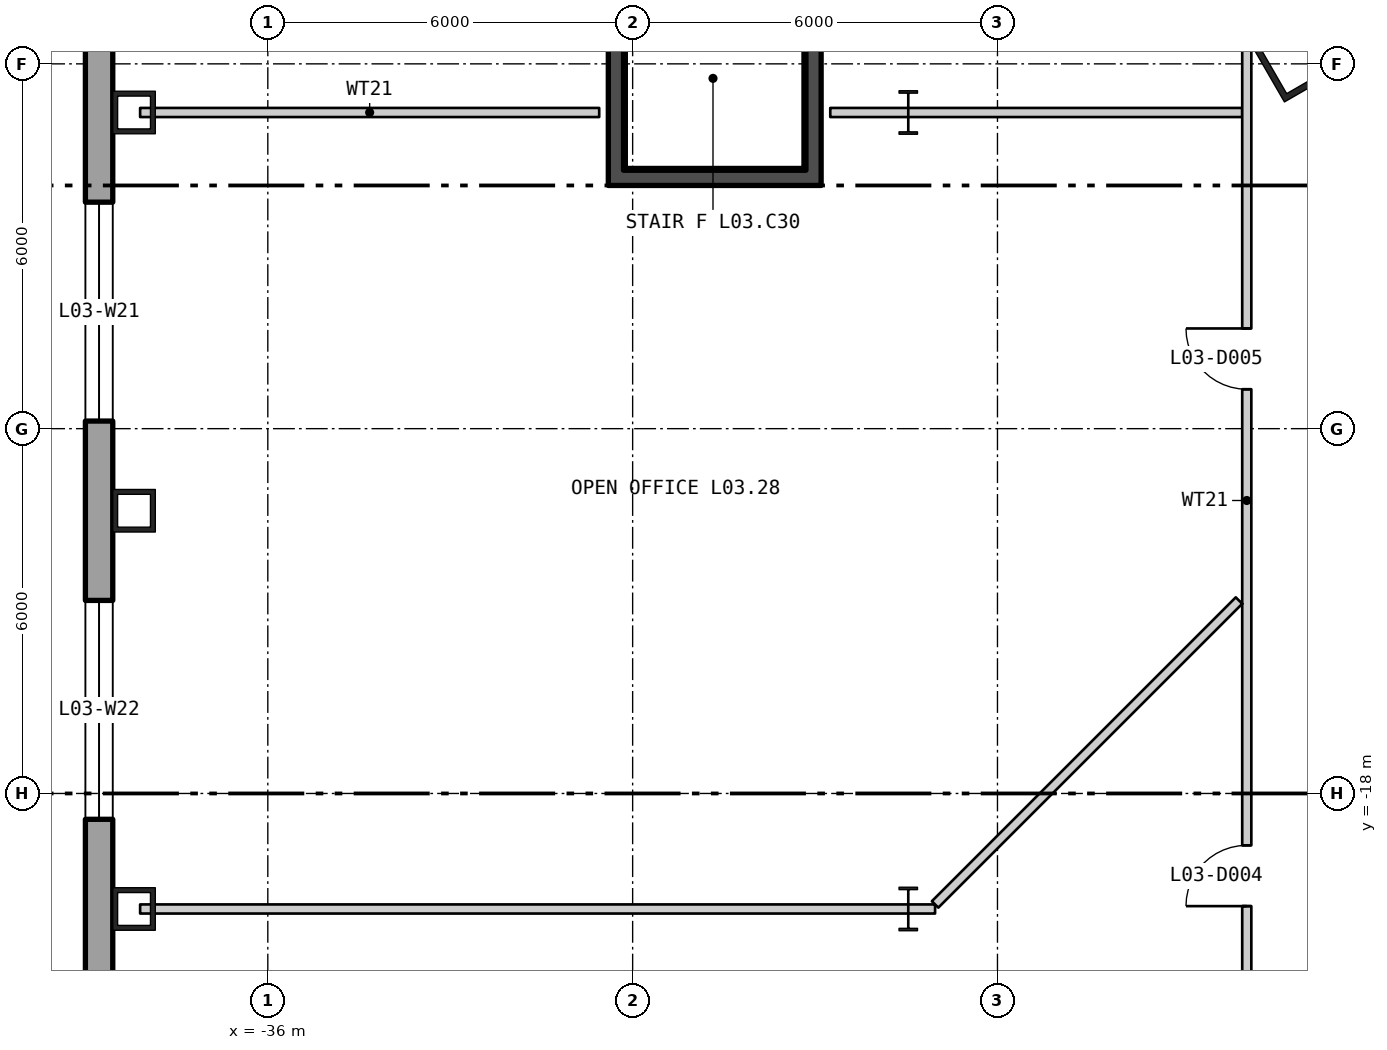
"""IFC4 building model, lengths in metres.
Left out: names, types, materials, properties, quantities, classifications, styles, units other than length and angle.
Written with IfcOpenShell. Run it as: python <this file> out.ifc"""

import sys

from ifc_helpers import new_model, si_unit, direction, frame, frame_2d, origin, origin_2d, place, context, subcontext, project, spatial, polyline, rectangle, hollow_rectangle, i_section, outline, extrude, element, fill, save


model = new_model("IFC4")
c1 = context("Model", 3, precision=1e-05, world=origin(), true_north=direction((0.0, 1.0)))
c2 = subcontext(c1, "Body", "Model", "MODEL_VIEW")
j1 = project(units=[si_unit("LENGTHUNIT", "METRE"), si_unit("PLANEANGLEUNIT", "RADIAN")], contexts=[c1])
p1 = place(None, origin())
s1 = spatial("IfcSite", under=j1, at=p1, CompositionType="ELEMENT")
p2 = place(p1, origin())
s2 = spatial("IfcBuilding", under=s1, at=p2, CompositionType="ELEMENT")
p3 = place(p2, frame((0.0, 0.0, 18.6)))
s3 = spatial("IfcBuildingStorey", under=s2, at=p3, CompositionType="ELEMENT", Elevation=18.6)
p4 = place(p3, frame((-19.061, -5.807, 0.0), z_axis=(0.0, 0.0, 1.0), x_axis=(0.5, -0.866025403784, 0.0)))
e1 = element("IfcColumn", 1, at=p4, inside=s3, PredefinedType="COLUMN", context=c2, shape_type="SweptSolid", body=[
    extrude(hollow_rectangle(XDim=1.2, YDim=1.2, WallThickness=0.1, at=origin_2d()), origin(), (0.0, 0.0, 1.0), 5.1),
])
for number, where, z_axis, x_axis in (
    (2, (-38.2, -6.8, 0.0), (0.0, 0.0, 1.0), (0.0, -1.0, 0.0)),
    (3, (-38.2, -13.35, 0.0), (0.0, 0.0, 1.0), (0.0, -1.0, 0.0)),
    (4, (-38.2, -19.9, 0.0), (0.0, 0.0, 1.0), (0.0, -1.0, 0.0)),
):
    element("IfcColumn", number, at=place(p3, frame(where, z_axis=z_axis, x_axis=x_axis)), inside=s3, PredefinedType="COLUMN", context=c2, shape_type="SweptSolid", body=[
        extrude(hollow_rectangle(XDim=0.7, YDim=0.7, WallThickness=0.08, at=origin_2d()), origin(), (0.0, 0.0, 1.0), 5.1),
    ])
for number, where, z_axis, x_axis in (
    (5, (-25.467, -6.8, 0.0), (0.0, 0.0, 1.0), (1.0, 0.0, 0.0)),
    (6, (-25.467, -19.9, 0.0), (0.0, 0.0, 1.0), (1.0, 0.0, 0.0)),
):
    element("IfcColumn", number, at=place(p3, frame(where, z_axis=z_axis, x_axis=x_axis)), inside=s3, PredefinedType="COLUMN", context=c2, shape_type="SweptSolid", body=[
        extrude(i_section(OverallWidth=0.304, OverallDepth=0.716, WebThickness=0.021, FlangeThickness=0.04, at=origin_2d()), origin(), (0.0, 0.0, 1.0), 5.1),
    ])
p5 = place(p3, frame((-38.775, 19.975, -0.4), z_axis=(0.0, 0.0, 1.0), x_axis=(0.0, -1.0, 0.0)))
e7 = element("IfcWall", 7, at=p5, inside=s3, PredefinedType="SOLIDWALL", context=c2, shape_type="SweptSolid", body=[
    extrude(outline(polyline([(-0.225, -0.225), (53.775, -0.225), (53.325, 0.225), (0.225, 0.225), (-0.225, -0.225)])), origin(), (0.0, 0.0, 1.0), 5.1),
])
p6 = place(p5, frame((2.05, 0.0, 1.3)))
e8 = element("IfcOpeningElement", 8, at=p6, cuts=e7, PredefinedType="OPENING", context=c2, shape_type="SweptSolid", body=[
    extrude(rectangle(XDim=3.6, YDim=3.2, at=frame_2d((1.8, 1.6))), frame((0.0, 0.235, 0.0), z_axis=(0.0, -1.0, 0.0), x_axis=(1.0, 0.0, 0.0)), (0.0, 0.0, 1.0), 0.47),
])
p7 = place(p5, frame((8.6, 0.0, 1.3)))
e9 = element("IfcOpeningElement", 9, at=p7, cuts=e7, PredefinedType="OPENING", context=c2, shape_type="SweptSolid", body=[
    extrude(rectangle(XDim=3.6, YDim=3.2, at=frame_2d((1.8, 1.6))), frame((0.0, 0.235, 0.0), z_axis=(0.0, -1.0, 0.0), x_axis=(1.0, 0.0, 0.0)), (0.0, 0.0, 1.0), 0.47),
])
p8 = place(p5, frame((15.15, 0.0, 1.3)))
e10 = element("IfcOpeningElement", 10, at=p8, cuts=e7, PredefinedType="OPENING", context=c2, shape_type="SweptSolid", body=[
    extrude(rectangle(XDim=3.6, YDim=3.2, at=frame_2d((1.8, 1.6))), frame((0.0, 0.235, 0.0), z_axis=(0.0, -1.0, 0.0), x_axis=(1.0, 0.0, 0.0)), (0.0, 0.0, 1.0), 0.47),
])
p9 = place(p5, frame((21.7, 0.0, 1.3)))
e11 = element("IfcOpeningElement", 11, at=p9, cuts=e7, PredefinedType="OPENING", context=c2, shape_type="SweptSolid", body=[
    extrude(rectangle(XDim=3.6, YDim=3.2, at=frame_2d((1.8, 1.6))), frame((0.0, 0.235, 0.0), z_axis=(0.0, -1.0, 0.0), x_axis=(1.0, 0.0, 0.0)), (0.0, 0.0, 1.0), 0.47),
])
p10 = place(p5, frame((28.25, 0.0, 1.3)))
e12 = element("IfcOpeningElement", 12, at=p10, cuts=e7, PredefinedType="OPENING", context=c2, shape_type="SweptSolid", body=[
    extrude(rectangle(XDim=3.6, YDim=3.2, at=frame_2d((1.8, 1.6))), frame((0.0, 0.235, 0.0), z_axis=(0.0, -1.0, 0.0), x_axis=(1.0, 0.0, 0.0)), (0.0, 0.0, 1.0), 0.47),
])
p11 = place(p5, frame((34.8, 0.0, 1.3)))
e13 = element("IfcOpeningElement", 13, at=p11, cuts=e7, PredefinedType="OPENING", context=c2, shape_type="SweptSolid", body=[
    extrude(rectangle(XDim=3.6, YDim=3.2, at=frame_2d((1.8, 1.6))), frame((0.0, 0.235, 0.0), z_axis=(0.0, -1.0, 0.0), x_axis=(1.0, 0.0, 0.0)), (0.0, 0.0, 1.0), 0.47),
])
p12 = place(p5, frame((41.35, 0.0, 1.3)))
e14 = element("IfcOpeningElement", 14, at=p12, cuts=e7, PredefinedType="OPENING", context=c2, shape_type="SweptSolid", body=[
    extrude(rectangle(XDim=3.6, YDim=3.2, at=frame_2d((1.8, 1.6))), frame((0.0, 0.235, 0.0), z_axis=(0.0, -1.0, 0.0), x_axis=(1.0, 0.0, 0.0)), (0.0, 0.0, 1.0), 0.47),
])
p13 = place(p5, frame((47.9, 0.0, 1.3)))
e15 = element("IfcOpeningElement", 15, at=p13, cuts=e7, PredefinedType="OPENING", context=c2, shape_type="SweptSolid", body=[
    extrude(rectangle(XDim=3.6, YDim=3.2, at=frame_2d((1.8, 1.6))), frame((0.0, 0.235, 0.0), z_axis=(0.0, -1.0, 0.0), x_axis=(1.0, 0.0, 0.0)), (0.0, 0.0, 1.0), 0.47),
])
p14 = place(p3, frame((-30.275, -7.75, 0.0), z_axis=(0.0, 0.0, 1.0), x_axis=(0.0, 1.0, 0.0)))
e16 = element("IfcWall", 16, at=p14, inside=s3, PredefinedType="SHEAR", context=c2, shape_type="SweptSolid", body=[
    extrude(rectangle(XDim=7.3, YDim=0.25, at=frame_2d((3.65, 0.0))), origin(), (0.0, 0.0, 1.0), 4.88),
])
p15 = place(p3, frame((-27.025, -7.75, 0.0), z_axis=(0.0, 0.0, 1.0), x_axis=(0.0, 1.0, 0.0)))
e17 = element("IfcWall", 17, at=p15, inside=s3, PredefinedType="SHEAR", context=c2, shape_type="SweptSolid", body=[
    extrude(rectangle(XDim=7.3, YDim=0.25, at=frame_2d((3.65, 0.0))), origin(), (0.0, 0.0, 1.0), 4.88),
])
p16 = place(p15, frame((5.7, 0.0, 0.0)))
e18 = element("IfcOpeningElement", 18, at=p16, cuts=e17, PredefinedType="OPENING", context=c2, shape_type="SweptSolid", body=[
    extrude(rectangle(XDim=1.2, YDim=2.1, at=frame_2d((0.6, 1.05))), frame((0.0, 0.135, 0.0), z_axis=(0.0, -1.0, 0.0), x_axis=(1.0, 0.0, 0.0)), (0.0, 0.0, 1.0), 0.27),
])
p17 = place(p3, frame((-30.4, -7.875, 0.0), z_axis=(0.0, 0.0, 1.0), x_axis=(1.0, 0.0, 0.0)))
e19 = element("IfcWall", 19, at=p17, inside=s3, PredefinedType="SHEAR", context=c2, shape_type="SweptSolid", body=[
    extrude(rectangle(XDim=3.5, YDim=0.25, at=frame_2d((1.75, 0.0))), origin(), (0.0, 0.0, 1.0), 4.88),
])
p18 = place(p3, frame((-38.1, -19.9, 0.0), z_axis=(0.0, 0.0, 1.0), x_axis=(1.0, 0.0, 0.0)))
e20 = element("IfcWall", 20, at=p18, inside=s3, PredefinedType="PARTITIONING", context=c2, shape_type="SweptSolid", body=[
    extrude(rectangle(XDim=12.633, YDim=0.15, at=frame_2d((6.316, 0.0))), origin(), (0.0, 0.0, 1.0), 4.09),
])
p19 = place(p3, frame((-25.467, -19.9, 0.0), z_axis=(0.0, 0.0, 1.0), x_axis=(1.0, 0.0, 0.0)))
e21 = element("IfcWall", 21, at=p19, inside=s3, PredefinedType="PARTITIONING", context=c2, shape_type="SweptSolid", body=[
    extrude(rectangle(XDim=0.441, YDim=0.15, at=frame_2d((0.221, 0.0))), origin(), (0.0, 0.0, 1.0), 4.88),
])
p20 = place(p3, frame((-38.1, -6.8, 0.0), z_axis=(0.0, 0.0, 1.0), x_axis=(1.0, 0.0, 0.0)))
e22 = element("IfcWall", 22, at=p20, inside=s3, PredefinedType="PARTITIONING", context=c2, shape_type="SweptSolid", body=[
    extrude(rectangle(XDim=7.55, YDim=0.15, at=frame_2d((3.775, 0.0))), origin(), (0.0, 0.0, 1.0), 4.09),
])
p21 = place(p3, frame((-26.75, -6.8, 0.0), z_axis=(0.0, 0.0, 1.0), x_axis=(1.0, 0.0, 0.0)))
e23 = element("IfcWall", 23, at=p21, inside=s3, PredefinedType="PARTITIONING", context=c2, shape_type="SweptSolid", body=[
    extrude(rectangle(XDim=6.775, YDim=0.15, at=frame_2d((3.388, 0.0))), origin(), (0.0, 0.0, 1.0), 4.09),
])
p22 = place(p3, frame((-25.026, -19.825, 0.0), z_axis=(0.0, 0.0, 1.0), x_axis=(0.707106781187, 0.707106781187, 0.0)))
e24 = element("IfcWall", 24, at=p22, inside=s3, PredefinedType="PARTITIONING", context=c2, shape_type="SweptSolid", body=[
    extrude(rectangle(XDim=7.068, YDim=0.15, at=frame_2d((3.534, 0.0))), origin(), (0.0, 0.0, 1.0), 4.88),
])
p23 = place(p3, frame((-19.9, -23.775, 0.0), z_axis=(0.0, 0.0, 1.0), x_axis=(0.0, 1.0, 0.0)))
e25 = element("IfcWall", 25, at=p23, inside=s3, PredefinedType="PARTITIONING", context=c2, shape_type="SweptSolid", body=[
    extrude(rectangle(XDim=21.187, YDim=0.15, at=frame_2d((10.594, 0.0))), origin(), (0.0, 0.0, 1.0), 4.88),
])
p24 = place(p23, frame((3.922, 0.0, 0.0)))
e26 = element("IfcOpeningElement", 26, at=p24, cuts=e25, PredefinedType="OPENING", context=c2, shape_type="SweptSolid", body=[
    extrude(rectangle(XDim=1.0, YDim=2.1, at=frame_2d((0.5, 1.05))), frame((0.0, 0.085, 0.0), z_axis=(0.0, -1.0, 0.0), x_axis=(1.0, 0.0, 0.0)), (0.0, 0.0, 1.0), 0.17),
])
p25 = place(p23, frame((12.423, 0.0, 0.0)))
e27 = element("IfcOpeningElement", 27, at=p25, cuts=e25, PredefinedType="OPENING", context=c2, shape_type="SweptSolid", body=[
    extrude(rectangle(XDim=1.0, YDim=2.1, at=frame_2d((0.5, 1.05))), frame((0.0, 0.085, 0.0), z_axis=(0.0, -1.0, 0.0), x_axis=(1.0, 0.0, 0.0)), (0.0, 0.0, 1.0), 0.17),
])
p26 = place(p10, origin())
e28 = element("IfcWindow", 28, at=p26, inside=s3, PartitioningType="SINGLE_PANEL", PredefinedType="WINDOW", context=c2, shape_type="SweptSolid", body=[
    extrude(rectangle(XDim=3.6, YDim=3.2, at=frame_2d((1.8, 1.6))), frame((0.0, 0.105, 0.0), z_axis=(0.0, -1.0, 0.0), x_axis=(1.0, 0.0, 0.0)), (0.0, 0.0, 1.0), 0.06),
])
fill(e12, e28)
p27 = place(p11, origin())
e29 = element("IfcWindow", 29, at=p27, inside=s3, PartitioningType="SINGLE_PANEL", PredefinedType="WINDOW", context=c2, shape_type="SweptSolid", body=[
    extrude(rectangle(XDim=3.6, YDim=3.2, at=frame_2d((1.8, 1.6))), frame((0.0, 0.105, 0.0), z_axis=(0.0, -1.0, 0.0), x_axis=(1.0, 0.0, 0.0)), (0.0, 0.0, 1.0), 0.06),
])
fill(e13, e29)
p28 = place(p24, origin())
e30 = element("IfcDoor", 30, at=p28, inside=s3, OperationType="SINGLE_SWING_RIGHT", PredefinedType="DOOR", context=c2, shape_type="SweptSolid", body=[
    extrude(rectangle(XDim=1.0, YDim=2.1, at=frame_2d((0.5, 1.05))), frame((0.0, 0.025, 0.0), z_axis=(0.0, -1.0, 0.0), x_axis=(1.0, 0.0, 0.0)), (0.0, 0.0, 1.0), 0.05),
])
fill(e26, e30)
p29 = place(p25, origin())
e31 = element("IfcDoor", 31, at=p29, inside=s3, OperationType="SINGLE_SWING_LEFT", PredefinedType="DOOR", context=c2, shape_type="SweptSolid", body=[
    extrude(rectangle(XDim=1.0, YDim=2.1, at=frame_2d((0.5, 1.05))), frame((0.0, 0.025, 0.0), z_axis=(0.0, -1.0, 0.0), x_axis=(1.0, 0.0, 0.0)), (0.0, 0.0, 1.0), 0.05),
])
fill(e27, e31)
save(model, sys.argv[1])
